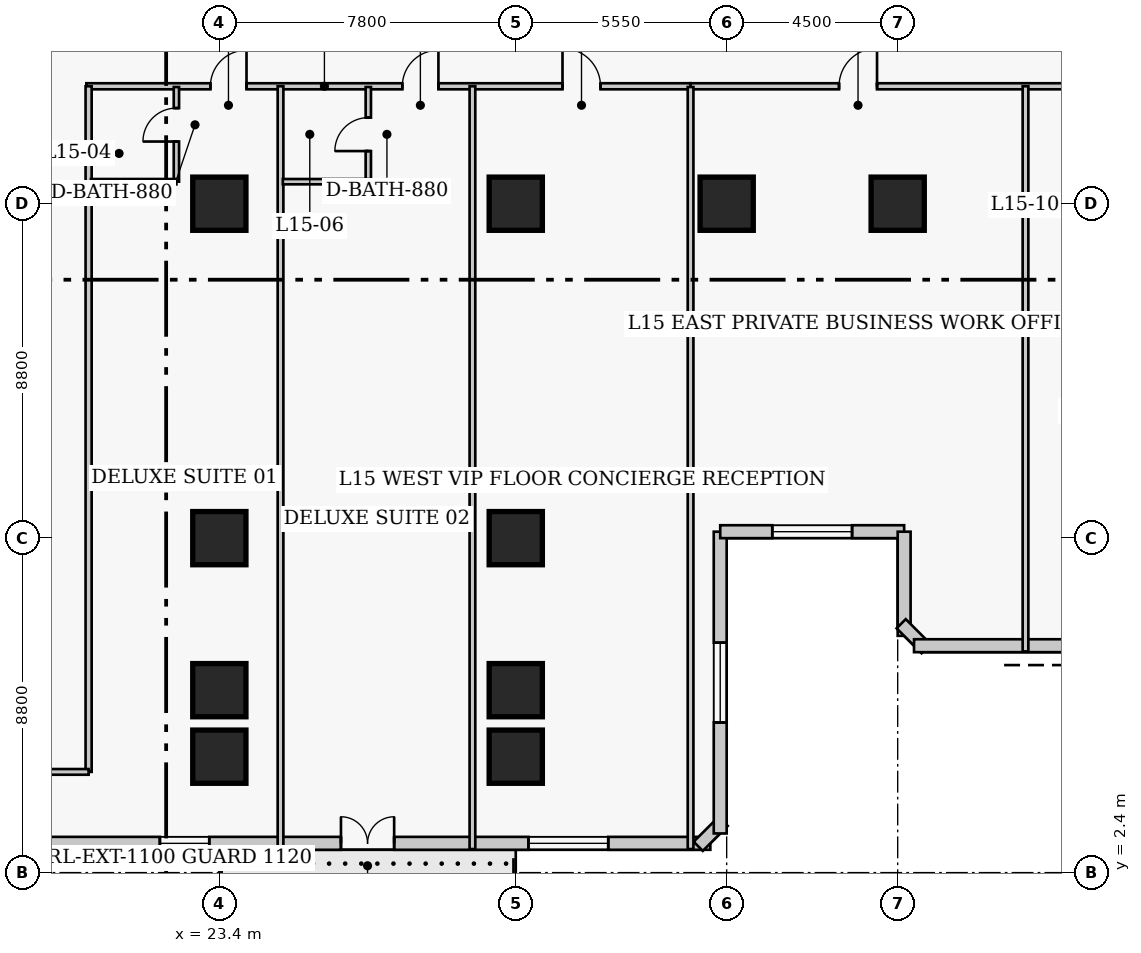
"""IFC4 building model, lengths in metres.
Left out: names, types, materials, properties, quantities, classifications, styles, units other than length and angle.
Written with IfcOpenShell. Run it as: python <this file> out.ifc"""

import sys

from ifc_helpers import new_model, si_unit, direction, frame, frame_2d, origin, origin_2d, place, context, subcontext, project, spatial, rectangle, extrude, element, fill, save


model = new_model("IFC4")
c1 = context("Model", 3, precision=1e-05, world=origin(), true_north=direction((0.0, 1.0)))
c2 = subcontext(c1, "Body", "Model", "MODEL_VIEW")
j1 = project(units=[si_unit("LENGTHUNIT", "METRE"), si_unit("PLANEANGLEUNIT", "RADIAN")], contexts=[c1])
p1 = place(None, origin())
s1 = spatial("IfcSite", under=j1, at=p1, CompositionType="ELEMENT")
p2 = place(p1, origin())
s2 = spatial("IfcBuilding", under=s1, at=p2, CompositionType="ELEMENT")
p3 = place(p2, frame((0.0, 0.0, 64.0)))
s3 = spatial("IfcBuildingStorey", under=s2, at=p3, CompositionType="ELEMENT", Elevation=64.0)
for number, where, z_axis, x_axis in (
    (1, (23.4, 11.2, 0.0), (0.0, 0.0, 1.0), (1.0, 0.0, 0.0)),
    (2, (23.4, 20.0, 0.0), (0.0, 0.0, 1.0), (1.0, 0.0, 0.0)),
    (3, (31.2, 11.2, 0.0), (0.0, 0.0, 1.0), (1.0, 0.0, 0.0)),
    (4, (31.2, 20.0, 0.0), (0.0, 0.0, 1.0), (1.0, 0.0, 0.0)),
    (5, (36.75, 20.0, 0.0), (0.0, 0.0, 1.0), (1.0, 0.0, 0.0)),
    (6, (41.25, 20.0, 0.0), (0.0, 0.0, 1.0), (1.0, 0.0, 0.0)),
    (7, (23.4, 7.2, 0.0), (0.0, 0.0, 1.0), (1.0, 0.0, 0.0)),
    (8, (31.2, 7.2, 0.0), (0.0, 0.0, 1.0), (1.0, 0.0, 0.0)),
    (9, (23.4, 5.45, 0.0), (0.0, 0.0, 1.0), (1.0, 0.0, 0.0)),
    (10, (31.2, 5.45, 0.0), (0.0, 0.0, 1.0), (1.0, 0.0, 0.0)),
):
    element("IfcColumn", number, at=place(p3, frame(where, z_axis=z_axis, x_axis=x_axis)), inside=s3, PredefinedType="COLUMN", context=c2, shape_type="SweptSolid", body=[
        extrude(rectangle(XDim=1.4, YDim=1.4, at=origin_2d()), origin(), (0.0, 0.0, 1.0), 3.8),
    ])
p4 = place(p3, frame((6.43, 3.17, 0.0), z_axis=(0.0, 0.0, 1.0), x_axis=(1.0, 0.0, 0.0)))
e11 = element("IfcWall", 11, at=p4, inside=s3, PredefinedType="SOLIDWALL", context=c2, shape_type="SweptSolid", body=[
    extrude(rectangle(XDim=29.89, YDim=0.34, at=frame_2d((14.945, 0.0))), origin(), (0.0, 0.0, 1.0), 3.54),
])
p5 = place(p4, frame((20.17, 0.0, 0.0)))
e12 = element("IfcOpeningElement", 12, at=p5, cuts=e11, PredefinedType="OPENING", context=c2, shape_type="SweptSolid", body=[
    extrude(rectangle(XDim=1.4, YDim=2.15, at=frame_2d((0.7, 1.075))), frame((0.0, 0.18, 0.0), z_axis=(0.0, -1.0, 0.0), x_axis=(1.0, 0.0, 0.0)), (0.0, 0.0, 1.0), 0.36),
])
p6 = place(p4, frame((2.686, 0.0, 0.85)))
e13 = element("IfcOpeningElement", 13, at=p6, cuts=e11, PredefinedType="OPENING", context=c2, shape_type="SweptSolid", body=[
    extrude(rectangle(XDim=2.1, YDim=1.85, at=frame_2d((1.05, 0.925))), frame((0.0, 0.18, 0.0), z_axis=(0.0, -1.0, 0.0), x_axis=(1.0, 0.0, 0.0)), (0.0, 0.0, 1.0), 0.36),
])
p7 = place(p4, frame((25.104, 0.0, 0.85)))
e14 = element("IfcOpeningElement", 14, at=p7, cuts=e11, PredefinedType="OPENING", context=c2, shape_type="SweptSolid", body=[
    extrude(rectangle(XDim=2.1, YDim=1.85, at=frame_2d((1.05, 0.925))), frame((0.0, 0.18, 0.0), z_axis=(0.0, -1.0, 0.0), x_axis=(1.0, 0.0, 0.0)), (0.0, 0.0, 1.0), 0.36),
])
p8 = place(p4, frame((15.405, 0.0, 0.85)))
e15 = element("IfcOpeningElement", 15, at=p8, cuts=e11, PredefinedType="OPENING", context=c2, shape_type="SweptSolid", body=[
    extrude(rectangle(XDim=1.3, YDim=1.7, at=frame_2d((0.65, 0.85))), frame((0.0, 0.18, 0.0), z_axis=(0.0, -1.0, 0.0), x_axis=(1.0, 0.0, 0.0)), (0.0, 0.0, 1.0), 0.36),
])
p9 = place(p3, frame((36.001, 3.092, 0.0), z_axis=(0.0, 0.0, 1.0), x_axis=(0.707106781187, 0.707106781187, 0.0)))
e16 = element("IfcWall", 16, at=p9, inside=s3, PredefinedType="SOLIDWALL", context=c2, shape_type="SweptSolid", body=[
    extrude(rectangle(XDim=0.929, YDim=0.34, at=frame_2d((0.464, 0.0))), origin(), (0.0, 0.0, 1.0), 3.54),
])
p10 = place(p3, frame((36.58, 3.43, 0.0), z_axis=(0.0, 0.0, 1.0), x_axis=(0.0, 1.0, 0.0)))
e17 = element("IfcWall", 17, at=p10, inside=s3, PredefinedType="SOLIDWALL", context=c2, shape_type="SweptSolid", body=[
    extrude(rectangle(XDim=7.94, YDim=0.34, at=frame_2d((3.97, 0.0))), origin(), (0.0, 0.0, 1.0), 3.54),
])
p11 = place(p10, frame((2.92, 0.0, 0.85)))
e18 = element("IfcOpeningElement", 18, at=p11, cuts=e17, PredefinedType="OPENING", context=c2, shape_type="SweptSolid", body=[
    extrude(rectangle(XDim=2.1, YDim=1.85, at=frame_2d((1.05, 0.925))), frame((0.0, 0.18, 0.0), z_axis=(0.0, -1.0, 0.0), x_axis=(1.0, 0.0, 0.0)), (0.0, 0.0, 1.0), 0.36),
])
p12 = place(p3, frame((36.58, 11.37, 0.0), z_axis=(0.0, 0.0, 1.0), x_axis=(1.0, 0.0, 0.0)))
e19 = element("IfcWall", 19, at=p12, inside=s3, PredefinedType="SOLIDWALL", context=c2, shape_type="SweptSolid", body=[
    extrude(rectangle(XDim=4.84, YDim=0.34, at=frame_2d((2.42, 0.0))), origin(), (0.0, 0.0, 1.0), 3.54),
])
p13 = place(p12, frame((1.37, 0.0, 0.85)))
e20 = element("IfcOpeningElement", 20, at=p13, cuts=e19, PredefinedType="OPENING", context=c2, shape_type="SweptSolid", body=[
    extrude(rectangle(XDim=2.1, YDim=1.85, at=frame_2d((1.05, 0.925))), frame((0.0, 0.18, 0.0), z_axis=(0.0, -1.0, 0.0), x_axis=(1.0, 0.0, 0.0)), (0.0, 0.0, 1.0), 0.36),
])
p14 = place(p3, frame((41.42, 11.37, 0.0), z_axis=(0.0, 0.0, 1.0), x_axis=(0.0, -1.0, 0.0)))
e21 = element("IfcWall", 21, at=p14, inside=s3, PredefinedType="SOLIDWALL", context=c2, shape_type="SweptSolid", body=[
    extrude(rectangle(XDim=2.74, YDim=0.34, at=frame_2d((1.37, 0.0))), origin(), (0.0, 0.0, 1.0), 3.54),
])
p15 = place(p3, frame((41.342, 8.948, 0.0), z_axis=(0.0, 0.0, 1.0), x_axis=(0.707238225886, -0.706975312048, 0.0)))
e22 = element("IfcWall", 22, at=p15, inside=s3, PredefinedType="SOLIDWALL", context=c2, shape_type="SweptSolid", body=[
    extrude(rectangle(XDim=0.929, YDim=0.34, at=frame_2d((0.464, 0.0))), origin(), (0.0, 0.0, 1.0), 3.54),
])
p16 = place(p3, frame((41.68, 8.37, 0.0), z_axis=(0.0, 0.0, 1.0), x_axis=(1.0, 0.0, 0.0)))
e23 = element("IfcWall", 23, at=p16, inside=s3, PredefinedType="SOLIDWALL", context=c2, shape_type="SweptSolid", body=[
    extrude(rectangle(XDim=29.89, YDim=0.34, at=frame_2d((14.945, 0.0))), origin(), (0.0, 0.0, 1.0), 3.54),
])
p17 = place(p16, frame((16.981, 0.0, 0.85)))
e24 = element("IfcOpeningElement", 24, at=p17, cuts=e23, PredefinedType="OPENING", context=c2, shape_type="SweptSolid", body=[
    extrude(rectangle(XDim=2.1, YDim=1.85, at=frame_2d((1.05, 0.925))), frame((0.0, 0.18, 0.0), z_axis=(0.0, -1.0, 0.0), x_axis=(1.0, 0.0, 0.0)), (0.0, 0.0, 1.0), 0.36),
])
p18 = place(p16, frame((26.254, 0.0, 0.85)))
e25 = element("IfcOpeningElement", 25, at=p18, cuts=e23, PredefinedType="OPENING", context=c2, shape_type="SweptSolid", body=[
    extrude(rectangle(XDim=2.1, YDim=1.85, at=frame_2d((1.05, 0.925))), frame((0.0, 0.18, 0.0), z_axis=(0.0, -1.0, 0.0), x_axis=(1.0, 0.0, 0.0)), (0.0, 0.0, 1.0), 0.36),
])
p19 = place(p16, frame((6.15, 0.0, 0.85)))
e26 = element("IfcOpeningElement", 26, at=p19, cuts=e23, PredefinedType="OPENING", context=c2, shape_type="SweptSolid", body=[
    extrude(rectangle(XDim=1.3, YDim=1.7, at=frame_2d((0.65, 0.85))), frame((0.0, 0.18, 0.0), z_axis=(0.0, -1.0, 0.0), x_axis=(1.0, 0.0, 0.0)), (0.0, 0.0, 1.0), 0.36),
])
p20 = place(p16, frame((13.763, 0.0, 0.85)))
e27 = element("IfcOpeningElement", 27, at=p20, cuts=e23, PredefinedType="OPENING", context=c2, shape_type="SweptSolid", body=[
    extrude(rectangle(XDim=1.3, YDim=1.7, at=frame_2d((0.65, 0.85))), frame((0.0, 0.18, 0.0), z_axis=(0.0, -1.0, 0.0), x_axis=(1.0, 0.0, 0.0)), (0.0, 0.0, 1.0), 0.36),
])
p21 = place(p3, frame((19.9, 23.09, 0.0), z_axis=(0.0, 0.0, 1.0), x_axis=(1.0, 0.0, 0.0)))
e28 = element("IfcWall", 28, at=p21, inside=s3, PredefinedType="PARTITIONING", context=c2, shape_type="SweptSolid", body=[
    extrude(rectangle(XDim=15.9, YDim=0.16, at=frame_2d((7.95, 0.0))), origin(), (0.0, 0.0, 1.0), 3.54),
])
p22 = place(p21, frame((3.265, 0.0, 0.0)))
e29 = element("IfcOpeningElement", 29, at=p22, cuts=e28, PredefinedType="OPENING", context=c2, shape_type="SweptSolid", body=[
    extrude(rectangle(XDim=0.95, YDim=2.1, at=frame_2d((0.475, 1.05))), frame((0.0, 0.09, 0.0), z_axis=(0.0, -1.0, 0.0), x_axis=(1.0, 0.0, 0.0)), (0.0, 0.0, 1.0), 0.18),
])
p23 = place(p21, frame((8.315, 0.0, 0.0)))
e30 = element("IfcOpeningElement", 30, at=p23, cuts=e28, PredefinedType="OPENING", context=c2, shape_type="SweptSolid", body=[
    extrude(rectangle(XDim=0.95, YDim=2.1, at=frame_2d((0.475, 1.05))), frame((0.0, 0.09, 0.0), z_axis=(0.0, -1.0, 0.0), x_axis=(1.0, 0.0, 0.0)), (0.0, 0.0, 1.0), 0.18),
])
p24 = place(p21, frame((12.53, 0.0, 0.0)))
e31 = element("IfcOpeningElement", 31, at=p24, cuts=e28, PredefinedType="OPENING", context=c2, shape_type="SweptSolid", body=[
    extrude(rectangle(XDim=1.0, YDim=2.15, at=frame_2d((0.5, 1.075))), frame((0.0, 0.09, 0.0), z_axis=(0.0, -1.0, 0.0), x_axis=(1.0, 0.0, 0.0)), (0.0, 0.0, 1.0), 0.18),
])
p25 = place(p3, frame((35.8, 23.09, 0.0), z_axis=(0.0, 0.0, 1.0), x_axis=(1.0, 0.0, 0.0)))
e32 = element("IfcWall", 32, at=p25, inside=s3, PredefinedType="PARTITIONING", context=c2, shape_type="SweptSolid", body=[
    extrude(rectangle(XDim=23.2, YDim=0.16, at=frame_2d((11.6, 0.0))), origin(), (0.0, 0.0, 1.0), 3.54),
])
p26 = place(p25, frame((3.907, 0.0, 0.0)))
e33 = element("IfcOpeningElement", 33, at=p26, cuts=e32, PredefinedType="OPENING", context=c2, shape_type="SweptSolid", body=[
    extrude(rectangle(XDim=1.0, YDim=2.15, at=frame_2d((0.5, 1.075))), frame((0.0, 0.09, 0.0), z_axis=(0.0, -1.0, 0.0), x_axis=(1.0, 0.0, 0.0)), (0.0, 0.0, 1.0), 0.18),
])
p27 = place(p25, frame((11.04, 0.0, 0.0)))
e34 = element("IfcOpeningElement", 34, at=p27, cuts=e32, PredefinedType="OPENING", context=c2, shape_type="SweptSolid", body=[
    extrude(rectangle(XDim=0.95, YDim=2.1, at=frame_2d((0.475, 1.05))), frame((0.0, 0.09, 0.0), z_axis=(0.0, -1.0, 0.0), x_axis=(1.0, 0.0, 0.0)), (0.0, 0.0, 1.0), 0.18),
])
p28 = place(p25, frame((18.203, 0.0, 0.0)))
e35 = element("IfcOpeningElement", 35, at=p28, cuts=e32, PredefinedType="OPENING", context=c2, shape_type="SweptSolid", body=[
    extrude(rectangle(XDim=0.95, YDim=2.1, at=frame_2d((0.475, 1.05))), frame((0.0, 0.09, 0.0), z_axis=(0.0, -1.0, 0.0), x_axis=(1.0, 0.0, 0.0)), (0.0, 0.0, 1.0), 0.18),
])
p29 = place(p3, frame((19.96, 5.05, 0.0), z_axis=(0.0, 0.0, 1.0), x_axis=(0.0, 1.0, 0.0)))
e36 = element("IfcWall", 36, at=p29, inside=s3, PredefinedType="PARTITIONING", context=c2, shape_type="SweptSolid", body=[
    extrude(rectangle(XDim=18.04, YDim=0.16, at=frame_2d((9.02, 0.0))), origin(), (0.0, 0.0, 1.0), 3.54),
])
p30 = place(p3, frame((17.74, 5.05, 0.0), z_axis=(0.0, 0.0, 1.0), x_axis=(1.0, 0.0, 0.0)))
e37 = element("IfcWall", 37, at=p30, inside=s3, PredefinedType="PARTITIONING", context=c2, shape_type="SweptSolid", body=[
    extrude(rectangle(XDim=2.22, YDim=0.15, at=frame_2d((1.11, 0.0))), origin(), (0.0, 0.0, 1.0), 3.54),
])
p31 = place(p3, frame((22.27, 20.58, 0.0), z_axis=(0.0, 0.0, 1.0), x_axis=(0.0, 1.0, 0.0)))
e38 = element("IfcWall", 38, at=p31, inside=s3, PredefinedType="PLUMBINGWALL", context=c2, shape_type="SweptSolid", body=[
    extrude(rectangle(XDim=2.49, YDim=0.14, at=frame_2d((1.245, 0.0))), origin(), (0.0, 0.0, 1.0), 3.54),
])
p32 = place(p31, frame((1.056, 0.0, 0.0)))
e39 = element("IfcOpeningElement", 39, at=p32, cuts=e38, PredefinedType="OPENING", context=c2, shape_type="SweptSolid", body=[
    extrude(rectangle(XDim=0.88, YDim=2.05, at=frame_2d((0.44, 1.025))), frame((0.0, 0.08, 0.0), z_axis=(0.0, -1.0, 0.0), x_axis=(1.0, 0.0, 0.0)), (0.0, 0.0, 1.0), 0.16),
])
p33 = place(p3, frame((20.02, 20.58, 0.0), z_axis=(0.0, 0.0, 1.0), x_axis=(1.0, 0.0, 0.0)))
e40 = element("IfcWall", 40, at=p33, inside=s3, PredefinedType="PLUMBINGWALL", context=c2, shape_type="SweptSolid", body=[
    extrude(rectangle(XDim=2.25, YDim=0.14, at=frame_2d((1.125, 0.0))), origin(), (0.0, 0.0, 1.0), 3.54),
])
p34 = place(p3, frame((25.01, 3.02, 0.0), z_axis=(0.0, 0.0, 1.0), x_axis=(0.0, 1.0, 0.0)))
e41 = element("IfcWall", 41, at=p34, inside=s3, PredefinedType="PARTITIONING", context=c2, shape_type="SweptSolid", body=[
    extrude(rectangle(XDim=20.07, YDim=0.15, at=frame_2d((10.035, 0.0))), origin(), (0.0, 0.0, 1.0), 3.54),
])
p35 = place(p3, frame((27.32, 20.58, 0.0), z_axis=(0.0, 0.0, 1.0), x_axis=(0.0, 1.0, 0.0)))
e42 = element("IfcWall", 42, at=p35, inside=s3, PredefinedType="PLUMBINGWALL", context=c2, shape_type="SweptSolid", body=[
    extrude(rectangle(XDim=2.49, YDim=0.14, at=frame_2d((1.245, 0.0))), origin(), (0.0, 0.0, 1.0), 3.54),
])
p36 = place(p35, frame((0.805, 0.0, 0.0)))
e43 = element("IfcOpeningElement", 43, at=p36, cuts=e42, PredefinedType="OPENING", context=c2, shape_type="SweptSolid", body=[
    extrude(rectangle(XDim=0.88, YDim=2.05, at=frame_2d((0.44, 1.025))), frame((0.0, 0.08, 0.0), z_axis=(0.0, -1.0, 0.0), x_axis=(1.0, 0.0, 0.0)), (0.0, 0.0, 1.0), 0.16),
])
p37 = place(p3, frame((25.07, 20.58, 0.0), z_axis=(0.0, 0.0, 1.0), x_axis=(1.0, 0.0, 0.0)))
e44 = element("IfcWall", 44, at=p37, inside=s3, PredefinedType="PLUMBINGWALL", context=c2, shape_type="SweptSolid", body=[
    extrude(rectangle(XDim=2.25, YDim=0.14, at=frame_2d((1.125, 0.0))), origin(), (0.0, 0.0, 1.0), 3.54),
])
p38 = place(p3, frame((30.06, 3.02, 0.0), z_axis=(0.0, 0.0, 1.0), x_axis=(0.0, 1.0, 0.0)))
e45 = element("IfcWall", 45, at=p38, inside=s3, PredefinedType="PARTITIONING", context=c2, shape_type="SweptSolid", body=[
    extrude(rectangle(XDim=20.07, YDim=0.15, at=frame_2d((10.035, 0.0))), origin(), (0.0, 0.0, 1.0), 3.54),
])
p39 = place(p3, frame((35.8, 3.02, 0.0), z_axis=(0.0, 0.0, 1.0), x_axis=(0.0, 1.0, 0.0)))
e46 = element("IfcWall", 46, at=p39, inside=s3, PredefinedType="PARTITIONING", context=c2, shape_type="SweptSolid", body=[
    extrude(rectangle(XDim=20.05, YDim=0.15, at=frame_2d((10.025, 0.0))), origin(), (0.0, 0.0, 1.0), 3.54),
])
p40 = place(p3, frame((44.613, 8.22, 0.0), z_axis=(0.0, 0.0, 1.0), x_axis=(0.0, 1.0, 0.0)))
e47 = element("IfcWall", 47, at=p40, inside=s3, PredefinedType="PARTITIONING", context=c2, shape_type="SweptSolid", body=[
    extrude(rectangle(XDim=14.87, YDim=0.15, at=frame_2d((7.435, 0.0))), origin(), (0.0, 0.0, 1.0), 3.54),
])
p41 = place(p5, origin())
e48 = element("IfcDoor", 48, at=p41, inside=s3, OperationType="DOUBLE_DOOR_SINGLE_SWING", PredefinedType="DOOR", context=c2, shape_type="SweptSolid", body=[
    extrude(rectangle(XDim=1.4, YDim=2.15, at=frame_2d((0.7, 1.075))), frame((0.0, 0.025, 0.0), z_axis=(0.0, -1.0, 0.0), x_axis=(1.0, 0.0, 0.0)), (0.0, 0.0, 1.0), 0.05),
])
fill(e12, e48)
p42 = place(p7, origin())
e49 = element("IfcWindow", 49, at=p42, inside=s3, PartitioningType="SINGLE_PANEL", PredefinedType="WINDOW", context=c2, shape_type="SweptSolid", body=[
    extrude(rectangle(XDim=2.1, YDim=1.85, at=frame_2d((1.05, 0.925))), frame((0.0, 0.03, 0.0), z_axis=(0.0, -1.0, 0.0), x_axis=(1.0, 0.0, 0.0)), (0.0, 0.0, 1.0), 0.06),
])
fill(e14, e49)
p43 = place(p11, origin())
e50 = element("IfcWindow", 50, at=p43, inside=s3, PartitioningType="SINGLE_PANEL", PredefinedType="WINDOW", context=c2, shape_type="SweptSolid", body=[
    extrude(rectangle(XDim=2.1, YDim=1.85, at=frame_2d((1.05, 0.925))), frame((0.0, 0.03, 0.0), z_axis=(0.0, -1.0, 0.0), x_axis=(1.0, 0.0, 0.0)), (0.0, 0.0, 1.0), 0.06),
])
fill(e18, e50)
p44 = place(p13, origin())
e51 = element("IfcWindow", 51, at=p44, inside=s3, PartitioningType="SINGLE_PANEL", PredefinedType="WINDOW", context=c2, shape_type="SweptSolid", body=[
    extrude(rectangle(XDim=2.1, YDim=1.85, at=frame_2d((1.05, 0.925))), frame((0.0, 0.03, 0.0), z_axis=(0.0, -1.0, 0.0), x_axis=(1.0, 0.0, 0.0)), (0.0, 0.0, 1.0), 0.06),
])
fill(e20, e51)
p45 = place(p8, origin())
e52 = element("IfcWindow", 52, at=p45, inside=s3, PartitioningType="SINGLE_PANEL", PredefinedType="WINDOW", context=c2, shape_type="SweptSolid", body=[
    extrude(rectangle(XDim=1.3, YDim=1.7, at=frame_2d((0.65, 0.85))), frame((0.0, 0.03, 0.0), z_axis=(0.0, -1.0, 0.0), x_axis=(1.0, 0.0, 0.0)), (0.0, 0.0, 1.0), 0.06),
])
fill(e15, e52)
p46 = place(p32, origin())
e53 = element("IfcDoor", 53, at=p46, inside=s3, OperationType="SINGLE_SWING_LEFT", PredefinedType="DOOR", context=c2, shape_type="SweptSolid", body=[
    extrude(rectangle(XDim=0.88, YDim=2.05, at=frame_2d((0.44, 1.025))), frame((0.0, 0.025, 0.0), z_axis=(0.0, -1.0, 0.0), x_axis=(1.0, 0.0, 0.0)), (0.0, 0.0, 1.0), 0.05),
])
fill(e39, e53)
p47 = place(p22, origin())
e54 = element("IfcDoor", 54, at=p47, inside=s3, OperationType="SINGLE_SWING_RIGHT", PredefinedType="DOOR", context=c2, shape_type="SweptSolid", body=[
    extrude(rectangle(XDim=0.95, YDim=2.1, at=frame_2d((0.475, 1.05))), frame((0.0, 0.025, 0.0), z_axis=(0.0, -1.0, 0.0), x_axis=(1.0, 0.0, 0.0)), (0.0, 0.0, 1.0), 0.05),
])
fill(e29, e54)
p48 = place(p36, origin())
e55 = element("IfcDoor", 55, at=p48, inside=s3, OperationType="SINGLE_SWING_LEFT", PredefinedType="DOOR", context=c2, shape_type="SweptSolid", body=[
    extrude(rectangle(XDim=0.88, YDim=2.05, at=frame_2d((0.44, 1.025))), frame((0.0, 0.025, 0.0), z_axis=(0.0, -1.0, 0.0), x_axis=(1.0, 0.0, 0.0)), (0.0, 0.0, 1.0), 0.05),
])
fill(e43, e55)
p49 = place(p23, origin())
e56 = element("IfcDoor", 56, at=p49, inside=s3, OperationType="SINGLE_SWING_RIGHT", PredefinedType="DOOR", context=c2, shape_type="SweptSolid", body=[
    extrude(rectangle(XDim=0.95, YDim=2.1, at=frame_2d((0.475, 1.05))), frame((0.0, 0.025, 0.0), z_axis=(0.0, -1.0, 0.0), x_axis=(1.0, 0.0, 0.0)), (0.0, 0.0, 1.0), 0.05),
])
fill(e30, e56)
p50 = place(p24, origin())
e57 = element("IfcDoor", 57, at=p50, inside=s3, OperationType="SINGLE_SWING_LEFT", PredefinedType="DOOR", context=c2, shape_type="SweptSolid", body=[
    extrude(rectangle(XDim=1.0, YDim=2.15, at=frame_2d((0.5, 1.075))), frame((0.0, 0.025, 0.0), z_axis=(0.0, -1.0, 0.0), x_axis=(1.0, 0.0, 0.0)), (0.0, 0.0, 1.0), 0.05),
])
fill(e31, e57)
p51 = place(p26, origin())
e58 = element("IfcDoor", 58, at=p51, inside=s3, OperationType="SINGLE_SWING_RIGHT", PredefinedType="DOOR", context=c2, shape_type="SweptSolid", body=[
    extrude(rectangle(XDim=1.0, YDim=2.15, at=frame_2d((0.5, 1.075))), frame((0.0, 0.025, 0.0), z_axis=(0.0, -1.0, 0.0), x_axis=(1.0, 0.0, 0.0)), (0.0, 0.0, 1.0), 0.05),
])
fill(e33, e58)
save(model, sys.argv[1])
